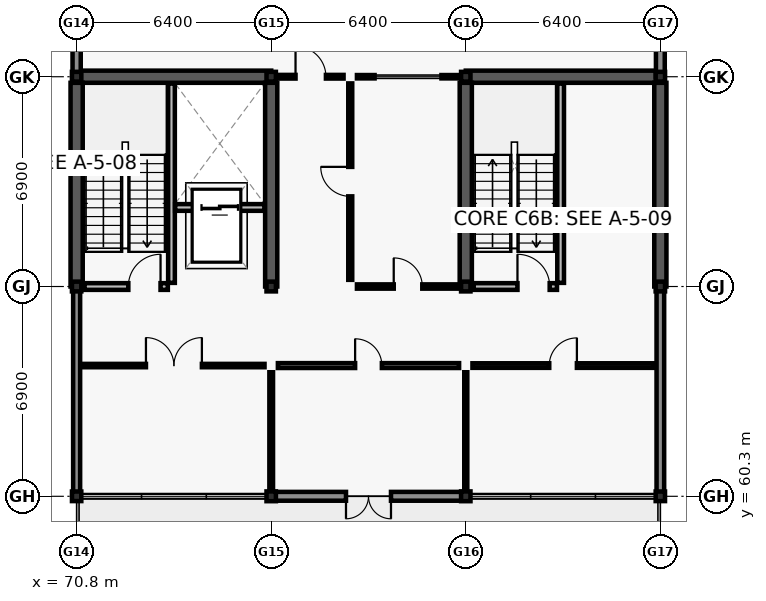
"""IFC4 building model, lengths in metres.
Left out: names, types, materials, properties, quantities, classifications, styles, units other than length and angle.
Written with IfcOpenShell. Run it as: python <this file> out.ifc"""

import sys

from ifc_helpers import new_model, si_unit, direction, frame, frame_2d, origin, origin_2d, place, context, subcontext, project, spatial, rectangle, i_section, extrude, element, fill, save


model = new_model("IFC4")
c1 = context("Model", 3, precision=1e-05, world=origin(), true_north=direction((0.0, 1.0)))
c2 = subcontext(c1, "Body", "Model", "MODEL_VIEW")
j1 = project(units=[si_unit("LENGTHUNIT", "METRE"), si_unit("PLANEANGLEUNIT", "RADIAN")], contexts=[c1])
p1 = place(None, origin())
s1 = spatial("IfcSite", under=j1, at=p1, CompositionType="ELEMENT")
p2 = place(p1, origin())
s2 = spatial("IfcBuilding", under=s1, at=p2, CompositionType="ELEMENT")
p3 = place(p2, frame((0.0, 0.0, 9.6)))
s3 = spatial("IfcBuildingStorey", under=s2, at=p3, CompositionType="ELEMENT", Elevation=9.6)
p4 = place(p3, frame((70.8, 60.3, 0.0), z_axis=(0.0, 0.0, 1.0), x_axis=(1.0, 0.0, 0.0)))
e1 = element("IfcColumn", 1, at=p4, inside=s3, PredefinedType="COLUMN", context=c2, shape_type="SweptSolid", body=[
    extrude(i_section(OverallWidth=0.307, OverallDepth=0.315, WebThickness=0.012, FlangeThickness=0.019, FilletRadius=0.017, at=origin_2d()), origin(), (0.0, 0.0, 1.0), 3.9),
])
for number, where, z_axis, x_axis in (
    (2, (70.8, 67.2, 0.0), (0.0, 0.0, 1.0), (1.0, 0.0, 0.0)),
    (3, (70.8, 74.1, 0.0), (0.0, 0.0, 1.0), (1.0, 0.0, 0.0)),
    (4, (77.2, 60.3, 0.0), (0.0, 0.0, 1.0), (1.0, 0.0, 0.0)),
    (5, (77.2, 67.2, 0.0), (0.0, 0.0, 1.0), (1.0, 0.0, 0.0)),
    (6, (77.2, 74.1, 0.0), (0.0, 0.0, 1.0), (1.0, 0.0, 0.0)),
    (7, (83.6, 60.3, 0.0), (0.0, 0.0, 1.0), (1.0, 0.0, 0.0)),
    (8, (83.6, 67.2, 0.0), (0.0, 0.0, 1.0), (1.0, 0.0, 0.0)),
    (9, (83.6, 74.1, 0.0), (0.0, 0.0, 1.0), (1.0, 0.0, 0.0)),
):
    element("IfcColumn", number, at=place(p3, frame(where, z_axis=z_axis, x_axis=x_axis)), inside=s3, PredefinedType="COLUMN", context=c2, shape_type="SweptSolid", body=[
        extrude(i_section(OverallWidth=0.309, OverallDepth=0.321, WebThickness=0.014, FlangeThickness=0.022, FilletRadius=0.017, at=origin_2d()), origin(), (0.0, 0.0, 1.0), 3.9),
    ])
p5 = place(p3, frame((90.0, 60.3, 0.0), z_axis=(0.0, 0.0, 1.0), x_axis=(1.0, 0.0, 0.0)))
e10 = element("IfcColumn", 10, at=p5, inside=s3, PredefinedType="COLUMN", context=c2, shape_type="SweptSolid", body=[
    extrude(i_section(OverallWidth=0.307, OverallDepth=0.315, WebThickness=0.012, FlangeThickness=0.019, FilletRadius=0.017, at=origin_2d()), origin(), (0.0, 0.0, 1.0), 3.9),
])
for number, where, z_axis, x_axis in (
    (11, (90.0, 67.2, 0.0), (0.0, 0.0, 1.0), (1.0, 0.0, 0.0)),
    (12, (90.0, 74.1, 0.0), (0.0, 0.0, 1.0), (1.0, 0.0, 0.0)),
):
    element("IfcColumn", number, at=place(p3, frame(where, z_axis=z_axis, x_axis=x_axis)), inside=s3, PredefinedType="COLUMN", context=c2, shape_type="SweptSolid", body=[
        extrude(i_section(OverallWidth=0.309, OverallDepth=0.321, WebThickness=0.014, FlangeThickness=0.022, FilletRadius=0.017, at=origin_2d()), origin(), (0.0, 0.0, 1.0), 3.9),
    ])
p6 = place(p3, frame((70.8, 74.1, 0.0), z_axis=(0.0, 0.0, 1.0), x_axis=(1.0, 0.0, 0.0)))
e13 = element("IfcWall", 13, at=p6, inside=s3, PredefinedType="SHEAR", context=c2, shape_type="SweptSolid", body=[
    extrude(rectangle(XDim=6.4, YDim=0.4, at=frame_2d((3.2, 0.0))), origin(), (0.0, 0.0, 1.0), 3.66),
])
for number, where, z_axis, x_axis in (
    (14, (70.8, 67.2, 0.0), (0.0, 0.0, 1.0), (0.0, 1.0, 0.0)),
    (15, (77.2, 67.2, 0.0), (0.0, 0.0, 1.0), (0.0, 1.0, 0.0)),
):
    element("IfcWall", number, at=place(p3, frame(where, z_axis=z_axis, x_axis=x_axis)), inside=s3, PredefinedType="SHEAR", context=c2, shape_type="SweptSolid", body=[
        extrude(rectangle(XDim=6.7, YDim=0.4, at=frame_2d((3.35, 0.0))), origin(), (0.0, 0.0, 1.0), 3.66),
    ])
p7 = place(p3, frame((83.6, 74.1, 0.0), z_axis=(0.0, 0.0, 1.0), x_axis=(1.0, 0.0, 0.0)))
e16 = element("IfcWall", 16, at=p7, inside=s3, PredefinedType="SHEAR", context=c2, shape_type="SweptSolid", body=[
    extrude(rectangle(XDim=6.4, YDim=0.4, at=frame_2d((3.2, 0.0))), origin(), (0.0, 0.0, 1.0), 3.66),
])
for number, where, z_axis, x_axis in (
    (17, (83.6, 67.2, 0.0), (0.0, 0.0, 1.0), (0.0, 1.0, 0.0)),
    (18, (90.0, 67.2, 0.0), (0.0, 0.0, 1.0), (0.0, 1.0, 0.0)),
):
    element("IfcWall", number, at=place(p3, frame(where, z_axis=z_axis, x_axis=x_axis)), inside=s3, PredefinedType="SHEAR", context=c2, shape_type="SweptSolid", body=[
        extrude(rectangle(XDim=6.7, YDim=0.4, at=frame_2d((3.35, 0.0))), origin(), (0.0, 0.0, 1.0), 3.66),
    ])
p8 = place(p3, frame((83.595, 60.3, 0.0), z_axis=(0.0, 0.0, 1.0), x_axis=(-1.0, 0.0, 0.0)))
e19 = element("IfcWall", 19, at=p8, inside=s3, PredefinedType="SOLIDWALL", context=c2, shape_type="SweptSolid", body=[
    extrude(rectangle(XDim=6.39, YDim=0.29, at=frame_2d((3.195, 0.0))), origin(), (0.0, 0.0, 1.0), 3.02),
])
p9 = place(p8, frame((2.455, 0.0, 0.0)))
e20 = element("IfcOpeningElement", 20, at=p9, cuts=e19, PredefinedType="OPENING", context=c2, shape_type="SweptSolid", body=[
    extrude(rectangle(XDim=1.48, YDim=2.16, at=frame_2d((0.74, 1.08))), frame((0.0, 0.155, 0.0), z_axis=(0.0, -1.0, 0.0), x_axis=(1.0, 0.0, 0.0)), (0.0, 0.0, 1.0), 0.31),
])
p10 = place(p3, frame((70.8, 60.305, 0.0), z_axis=(0.0, 0.0, 1.0), x_axis=(0.0, 1.0, 0.0)))
e21 = element("IfcWall", 21, at=p10, inside=s3, PredefinedType="SOLIDWALL", context=c2, shape_type="SweptSolid", body=[
    extrude(rectangle(XDim=6.89, YDim=0.23, at=frame_2d((3.445, 0.0))), origin(), (0.0, 0.0, 1.0), 3.02),
])
p11 = place(p3, frame((90.0, 67.195, 0.0), z_axis=(0.0, 0.0, 1.0), x_axis=(0.0, -1.0, 0.0)))
e22 = element("IfcWall", 22, at=p11, inside=s3, PredefinedType="SOLIDWALL", context=c2, shape_type="SweptSolid", body=[
    extrude(rectangle(XDim=6.89, YDim=0.25, at=frame_2d((3.445, 0.0))), origin(), (0.0, 0.0, 1.0), 3.02),
])
p12 = place(p3, frame((70.8, 74.105, 0.0), z_axis=(0.0, 0.0, 1.0), x_axis=(0.0, 1.0, 0.0)))
e23 = element("IfcWall", 23, at=p12, inside=s3, PredefinedType="SOLIDWALL", context=c2, shape_type="SweptSolid", body=[
    extrude(rectangle(XDim=6.89, YDim=0.27, at=frame_2d((3.445, 0.0))), origin(), (0.0, 0.0, 1.0), 3.02),
])
p13 = place(p12, frame((2.82, 0.0, 0.8)))
e24 = element("IfcOpeningElement", 24, at=p13, cuts=e23, PredefinedType="OPENING", context=c2, shape_type="SweptSolid", body=[
    extrude(rectangle(XDim=1.25, YDim=1.5, at=frame_2d((0.625, 0.75))), frame((0.0, 0.145, 0.0), z_axis=(0.0, -1.0, 0.0), x_axis=(1.0, 0.0, 0.0)), (0.0, 0.0, 1.0), 0.29),
])
p14 = place(p3, frame((90.0, 80.995, 0.0), z_axis=(0.0, 0.0, 1.0), x_axis=(0.0, -1.0, 0.0)))
e25 = element("IfcWall", 25, at=p14, inside=s3, PredefinedType="SOLIDWALL", context=c2, shape_type="SweptSolid", body=[
    extrude(rectangle(XDim=6.89, YDim=0.29, at=frame_2d((3.445, 0.0))), origin(), (0.0, 0.0, 1.0), 3.02),
])
p15 = place(p14, frame((2.745, 0.0, 0.8)))
e26 = element("IfcOpeningElement", 26, at=p15, cuts=e25, PredefinedType="OPENING", context=c2, shape_type="SweptSolid", body=[
    extrude(rectangle(XDim=1.4, YDim=1.5, at=frame_2d((0.7, 0.75))), frame((0.0, 0.155, 0.0), z_axis=(0.0, -1.0, 0.0), x_axis=(1.0, 0.0, 0.0)), (0.0, 0.0, 1.0), 0.31),
])
p16 = place(p3, frame((73.92, 67.32, 0.0), z_axis=(0.0, 0.0, 1.0), x_axis=(0.0, 1.0, 0.0)))
e27 = element("IfcWall", 27, at=p16, inside=s3, PredefinedType="SOLIDWALL", context=c2, shape_type="SweptSolid", body=[
    extrude(rectangle(XDim=6.555, YDim=0.22, at=frame_2d((3.277, 0.0))), origin(), (0.0, 0.0, 1.0), 3.66),
])
p17 = place(p3, frame((71.06, 67.2, 0.0), z_axis=(0.0, 0.0, 1.0), x_axis=(1.0, 0.0, 0.0)))
e28 = element("IfcWall", 28, at=p17, inside=s3, PredefinedType="SOLIDWALL", context=c2, shape_type="SweptSolid", body=[
    extrude(rectangle(XDim=2.74, YDim=0.22, at=frame_2d((1.37, 0.0))), origin(), (0.0, 0.0, 1.0), 3.02),
])
p18 = place(p17, frame((1.44, 0.0, 0.0)))
e29 = element("IfcOpeningElement", 29, at=p18, cuts=e28, PredefinedType="OPENING", context=c2, shape_type="SweptSolid", body=[
    extrude(rectangle(XDim=1.06, YDim=2.1, at=frame_2d((0.53, 1.05))), frame((0.0, 0.12, 0.0), z_axis=(0.0, -1.0, 0.0), x_axis=(1.0, 0.0, 0.0)), (0.0, 0.0, 1.0), 0.24),
])
p19 = place(p3, frame((74.04, 69.8, 0.0), z_axis=(0.0, 0.0, 1.0), x_axis=(1.0, 0.0, 0.0)))
e30 = element("IfcWall", 30, at=p19, inside=s3, PredefinedType="SOLIDWALL", context=c2, shape_type="SweptSolid", body=[
    extrude(rectangle(XDim=2.935, YDim=0.22, at=frame_2d((1.468, 0.0))), origin(), (0.0, 0.0, 1.0), 3.66),
])
p20 = place(p19, frame((0.867, 0.0, 0.0)))
e31 = element("IfcOpeningElement", 31, at=p20, cuts=e30, PredefinedType="OPENING", context=c2, shape_type="SweptSolid", body=[
    extrude(rectangle(XDim=1.2, YDim=2.15, at=frame_2d((0.6, 1.075))), frame((0.0, 0.12, 0.0), z_axis=(0.0, -1.0, 0.0), x_axis=(1.0, 0.0, 0.0)), (0.0, 0.0, 1.0), 0.24),
])
p21 = place(p3, frame((86.72, 67.32, 0.0), z_axis=(0.0, 0.0, 1.0), x_axis=(0.0, 1.0, 0.0)))
e32 = element("IfcWall", 32, at=p21, inside=s3, PredefinedType="SOLIDWALL", context=c2, shape_type="SweptSolid", body=[
    extrude(rectangle(XDim=6.555, YDim=0.22, at=frame_2d((3.277, 0.0))), origin(), (0.0, 0.0, 1.0), 3.66),
])
p22 = place(p3, frame((83.86, 67.2, 0.0), z_axis=(0.0, 0.0, 1.0), x_axis=(1.0, 0.0, 0.0)))
e33 = element("IfcWall", 33, at=p22, inside=s3, PredefinedType="SOLIDWALL", context=c2, shape_type="SweptSolid", body=[
    extrude(rectangle(XDim=2.74, YDim=0.22, at=frame_2d((1.37, 0.0))), origin(), (0.0, 0.0, 1.0), 3.02),
])
p23 = place(p22, frame((1.44, 0.0, 0.0)))
e34 = element("IfcOpeningElement", 34, at=p23, cuts=e33, PredefinedType="OPENING", context=c2, shape_type="SweptSolid", body=[
    extrude(rectangle(XDim=1.06, YDim=2.1, at=frame_2d((0.53, 1.05))), frame((0.0, 0.12, 0.0), z_axis=(0.0, -1.0, 0.0), x_axis=(1.0, 0.0, 0.0)), (0.0, 0.0, 1.0), 0.24),
])
p24 = place(p3, frame((77.2, 60.52, 0.0), z_axis=(0.0, 0.0, 1.0), x_axis=(0.0, 1.0, 0.0)))
e35 = element("IfcWall", 35, at=p24, inside=s3, PredefinedType="PARTITIONING", context=c2, shape_type="SweptSolid", body=[
    extrude(rectangle(XDim=3.86, YDim=0.12, at=frame_2d((1.93, 0.0))), origin(), (0.0, 0.0, 1.0), 3.0),
])
p25 = place(p3, frame((71.02, 64.6, 0.0), z_axis=(0.0, 0.0, 1.0), x_axis=(1.0, 0.0, 0.0)))
e36 = element("IfcWall", 36, at=p25, inside=s3, PredefinedType="PARTITIONING", context=c2, shape_type="SweptSolid", body=[
    extrude(rectangle(XDim=5.96, YDim=0.11, at=frame_2d((2.98, 0.0))), origin(), (0.0, 0.0, 1.0), 3.0),
])
p26 = place(p25, frame((2.06, 0.0, 0.0)))
e37 = element("IfcOpeningElement", 37, at=p26, cuts=e36, PredefinedType="OPENING", context=c2, shape_type="SweptSolid", body=[
    extrude(rectangle(XDim=1.84, YDim=2.22, at=frame_2d((0.92, 1.11))), frame((0.0, 0.065, 0.0), z_axis=(0.0, -1.0, 0.0), x_axis=(1.0, 0.0, 0.0)), (0.0, 0.0, 1.0), 0.13),
])
p27 = place(p3, frame((83.6, 60.52, 0.0), z_axis=(0.0, 0.0, 1.0), x_axis=(0.0, 1.0, 0.0)))
e38 = element("IfcWall", 38, at=p27, inside=s3, PredefinedType="PARTITIONING", context=c2, shape_type="SweptSolid", body=[
    extrude(rectangle(XDim=3.86, YDim=0.1, at=frame_2d((1.93, 0.0))), origin(), (0.0, 0.0, 1.0), 3.0),
])
p28 = place(p3, frame((77.42, 64.6, 0.0), z_axis=(0.0, 0.0, 1.0), x_axis=(1.0, 0.0, 0.0)))
e39 = element("IfcWall", 39, at=p28, inside=s3, PredefinedType="PARTITIONING", context=c2, shape_type="SweptSolid", body=[
    extrude(rectangle(XDim=5.96, YDim=0.16, at=frame_2d((2.98, 0.0))), origin(), (0.0, 0.0, 1.0), 3.0),
])
p29 = place(p28, frame((2.54, 0.0, 0.0)))
e40 = element("IfcOpeningElement", 40, at=p29, cuts=e39, PredefinedType="OPENING", context=c2, shape_type="SweptSolid", body=[
    extrude(rectangle(XDim=0.88, YDim=2.04, at=frame_2d((0.44, 1.02))), frame((0.0, 0.09, 0.0), z_axis=(0.0, -1.0, 0.0), x_axis=(1.0, 0.0, 0.0)), (0.0, 0.0, 1.0), 0.18),
])
p30 = place(p3, frame((83.82, 64.6, 0.0), z_axis=(0.0, 0.0, 1.0), x_axis=(1.0, 0.0, 0.0)))
e41 = element("IfcWall", 41, at=p30, inside=s3, PredefinedType="PARTITIONING", context=c2, shape_type="SweptSolid", body=[
    extrude(rectangle(XDim=5.96, YDim=0.15, at=frame_2d((2.98, 0.0))), origin(), (0.0, 0.0, 1.0), 3.0),
])
p31 = place(p30, frame((2.525, 0.0, 0.0)))
e42 = element("IfcOpeningElement", 42, at=p31, cuts=e41, PredefinedType="OPENING", context=c2, shape_type="SweptSolid", body=[
    extrude(rectangle(XDim=0.91, YDim=2.06, at=frame_2d((0.455, 1.03))), frame((0.0, 0.085, 0.0), z_axis=(0.0, -1.0, 0.0), x_axis=(1.0, 0.0, 0.0)), (0.0, 0.0, 1.0), 0.17),
])
p32 = place(p3, frame((80.02, 67.2, 0.0), z_axis=(0.0, 0.0, 1.0), x_axis=(1.0, 0.0, 0.0)))
e43 = element("IfcWall", 43, at=p32, inside=s3, PredefinedType="PARTITIONING", context=c2, shape_type="SweptSolid", body=[
    extrude(rectangle(XDim=3.36, YDim=0.14, at=frame_2d((1.68, 0.0))), origin(), (0.0, 0.0, 1.0), 3.0),
])
p33 = place(p32, frame((1.21, 0.0, 0.0)))
e44 = element("IfcOpeningElement", 44, at=p33, cuts=e43, PredefinedType="OPENING", context=c2, shape_type="SweptSolid", body=[
    extrude(rectangle(XDim=0.94, YDim=2.08, at=frame_2d((0.47, 1.04))), frame((0.0, 0.08, 0.0), z_axis=(0.0, -1.0, 0.0), x_axis=(1.0, 0.0, 0.0)), (0.0, 0.0, 1.0), 0.16),
])
p34 = place(p3, frame((79.8, 67.42, 0.0), z_axis=(0.0, 0.0, 1.0), x_axis=(0.0, 1.0, 0.0)))
e45 = element("IfcWall", 45, at=p34, inside=s3, PredefinedType="PARTITIONING", context=c2, shape_type="SweptSolid", body=[
    extrude(rectangle(XDim=6.46, YDim=0.13, at=frame_2d((3.23, 0.0))), origin(), (0.0, 0.0, 1.0), 3.0),
])
p35 = place(p34, frame((2.745, 0.0, 0.0)))
e46 = element("IfcOpeningElement", 46, at=p35, cuts=e45, PredefinedType="OPENING", context=c2, shape_type="SweptSolid", body=[
    extrude(rectangle(XDim=0.97, YDim=2.1, at=frame_2d((0.485, 1.05))), frame((0.0, 0.075, 0.0), z_axis=(0.0, -1.0, 0.0), x_axis=(1.0, 0.0, 0.0)), (0.0, 0.0, 1.0), 0.15),
])
p36 = place(p3, frame((77.42, 74.1, 0.0), z_axis=(0.0, 0.0, 1.0), x_axis=(1.0, 0.0, 0.0)))
e47 = element("IfcWall", 47, at=p36, inside=s3, PredefinedType="PARTITIONING", context=c2, shape_type="SweptSolid", body=[
    extrude(rectangle(XDim=2.16, YDim=0.12, at=frame_2d((1.08, 0.0))), origin(), (0.0, 0.0, 1.0), 3.0),
])
p37 = place(p36, frame((0.58, 0.0, 0.0)))
e48 = element("IfcOpeningElement", 48, at=p37, cuts=e47, PredefinedType="OPENING", context=c2, shape_type="SweptSolid", body=[
    extrude(rectangle(XDim=1.0, YDim=2.12, at=frame_2d((0.5, 1.06))), frame((0.0, 0.07, 0.0), z_axis=(0.0, -1.0, 0.0), x_axis=(1.0, 0.0, 0.0)), (0.0, 0.0, 1.0), 0.14),
])
p38 = place(p3, frame((80.02, 74.1, 0.0), z_axis=(0.0, 0.0, 1.0), x_axis=(1.0, 0.0, 0.0)))
e49 = element("IfcWall", 49, at=p38, inside=s3, PredefinedType="PARTITIONING", context=c2, shape_type="SweptSolid", body=[
    extrude(rectangle(XDim=3.36, YDim=0.11, at=frame_2d((1.68, 0.0))), origin(), (0.0, 0.0, 1.0), 3.0),
])
p39 = place(p38, frame((0.58, 0.0, 0.95)))
e50 = element("IfcOpeningElement", 50, at=p39, cuts=e49, PredefinedType="OPENING", context=c2, shape_type="SweptSolid", body=[
    extrude(rectangle(XDim=2.2, YDim=1.3, at=frame_2d((1.1, 0.65))), frame((0.0, 0.065, 0.0), z_axis=(0.0, -1.0, 0.0), x_axis=(1.0, 0.0, 0.0)), (0.0, 0.0, 1.0), 0.13),
])
p40 = place(p9, origin())
e51 = element("IfcDoor", 51, at=p40, inside=s3, OperationType="DOUBLE_DOOR_SINGLE_SWING", PredefinedType="DOOR", context=c2, shape_type="SweptSolid", body=[
    extrude(rectangle(XDim=1.48, YDim=2.16, at=frame_2d((0.74, 1.08))), frame((0.0, 0.025, 0.0), z_axis=(0.0, -1.0, 0.0), x_axis=(1.0, 0.0, 0.0)), (0.0, 0.0, 1.0), 0.05),
])
fill(e20, e51)
p41 = place(p18, origin())
e52 = element("IfcDoor", 52, at=p41, inside=s3, OperationType="SINGLE_SWING_RIGHT", PredefinedType="DOOR", context=c2, shape_type="SweptSolid", body=[
    extrude(rectangle(XDim=1.06, YDim=2.1, at=frame_2d((0.53, 1.05))), frame((0.0, 0.025, 0.0), z_axis=(0.0, -1.0, 0.0), x_axis=(1.0, 0.0, 0.0)), (0.0, 0.0, 1.0), 0.05),
])
fill(e29, e52)
p42 = place(p20, origin())
e53 = element("IfcDoor", 53, at=p42, inside=s3, OperationType="DOUBLE_DOOR_SLIDING", PredefinedType="DOOR", context=c2, shape_type="SweptSolid", body=[
    extrude(rectangle(XDim=1.2, YDim=2.15, at=frame_2d((0.6, 1.075))), frame((0.0, 0.025, 0.0), z_axis=(0.0, -1.0, 0.0), x_axis=(1.0, 0.0, 0.0)), (0.0, 0.0, 1.0), 0.05),
])
fill(e31, e53)
p43 = place(p23, origin())
e54 = element("IfcDoor", 54, at=p43, inside=s3, OperationType="SINGLE_SWING_LEFT", PredefinedType="DOOR", context=c2, shape_type="SweptSolid", body=[
    extrude(rectangle(XDim=1.06, YDim=2.1, at=frame_2d((0.53, 1.05))), frame((0.0, 0.025, 0.0), z_axis=(0.0, -1.0, 0.0), x_axis=(1.0, 0.0, 0.0)), (0.0, 0.0, 1.0), 0.05),
])
fill(e34, e54)
p44 = place(p26, origin())
e55 = element("IfcDoor", 55, at=p44, inside=s3, OperationType="DOUBLE_DOOR_SINGLE_SWING", PredefinedType="DOOR", context=c2, shape_type="SweptSolid", body=[
    extrude(rectangle(XDim=1.84, YDim=2.22, at=frame_2d((0.92, 1.11))), frame((0.0, 0.025, 0.0), z_axis=(0.0, -1.0, 0.0), x_axis=(1.0, 0.0, 0.0)), (0.0, 0.0, 1.0), 0.05),
])
fill(e37, e55)
p45 = place(p29, origin())
e56 = element("IfcDoor", 56, at=p45, inside=s3, OperationType="SINGLE_SWING_LEFT", PredefinedType="DOOR", context=c2, shape_type="SweptSolid", body=[
    extrude(rectangle(XDim=0.88, YDim=2.04, at=frame_2d((0.44, 1.02))), frame((0.0, 0.025, 0.0), z_axis=(0.0, -1.0, 0.0), x_axis=(1.0, 0.0, 0.0)), (0.0, 0.0, 1.0), 0.05),
])
fill(e40, e56)
p46 = place(p31, origin())
e57 = element("IfcDoor", 57, at=p46, inside=s3, OperationType="SINGLE_SWING_RIGHT", PredefinedType="DOOR", context=c2, shape_type="SweptSolid", body=[
    extrude(rectangle(XDim=0.91, YDim=2.06, at=frame_2d((0.455, 1.03))), frame((0.0, 0.025, 0.0), z_axis=(0.0, -1.0, 0.0), x_axis=(1.0, 0.0, 0.0)), (0.0, 0.0, 1.0), 0.05),
])
fill(e42, e57)
p47 = place(p33, origin())
e58 = element("IfcDoor", 58, at=p47, inside=s3, OperationType="SINGLE_SWING_LEFT", PredefinedType="DOOR", context=c2, shape_type="SweptSolid", body=[
    extrude(rectangle(XDim=0.94, YDim=2.08, at=frame_2d((0.47, 1.04))), frame((0.0, 0.025, 0.0), z_axis=(0.0, -1.0, 0.0), x_axis=(1.0, 0.0, 0.0)), (0.0, 0.0, 1.0), 0.05),
])
fill(e44, e58)
p48 = place(p35, origin())
e59 = element("IfcDoor", 59, at=p48, inside=s3, OperationType="SINGLE_SWING_RIGHT", PredefinedType="DOOR", context=c2, shape_type="SweptSolid", body=[
    extrude(rectangle(XDim=0.97, YDim=2.1, at=frame_2d((0.485, 1.05))), frame((0.0, 0.025, 0.0), z_axis=(0.0, -1.0, 0.0), x_axis=(1.0, 0.0, 0.0)), (0.0, 0.0, 1.0), 0.05),
])
fill(e46, e59)
p49 = place(p37, origin())
e60 = element("IfcDoor", 60, at=p49, inside=s3, OperationType="SINGLE_SWING_LEFT", PredefinedType="DOOR", context=c2, shape_type="SweptSolid", body=[
    extrude(rectangle(XDim=1.0, YDim=2.12, at=frame_2d((0.5, 1.06))), frame((0.0, 0.025, 0.0), z_axis=(0.0, -1.0, 0.0), x_axis=(1.0, 0.0, 0.0)), (0.0, 0.0, 1.0), 0.05),
])
fill(e48, e60)
p50 = place(p39, origin())
e61 = element("IfcWindow", 61, at=p50, inside=s3, PartitioningType="DOUBLE_PANEL_VERTICAL", PredefinedType="WINDOW", context=c2, shape_type="SweptSolid", body=[
    extrude(rectangle(XDim=2.2, YDim=1.3, at=frame_2d((1.1, 0.65))), frame((0.0, 0.03, 0.0), z_axis=(0.0, -1.0, 0.0), x_axis=(1.0, 0.0, 0.0)), (0.0, 0.0, 1.0), 0.06),
])
fill(e50, e61)
save(model, sys.argv[1])
